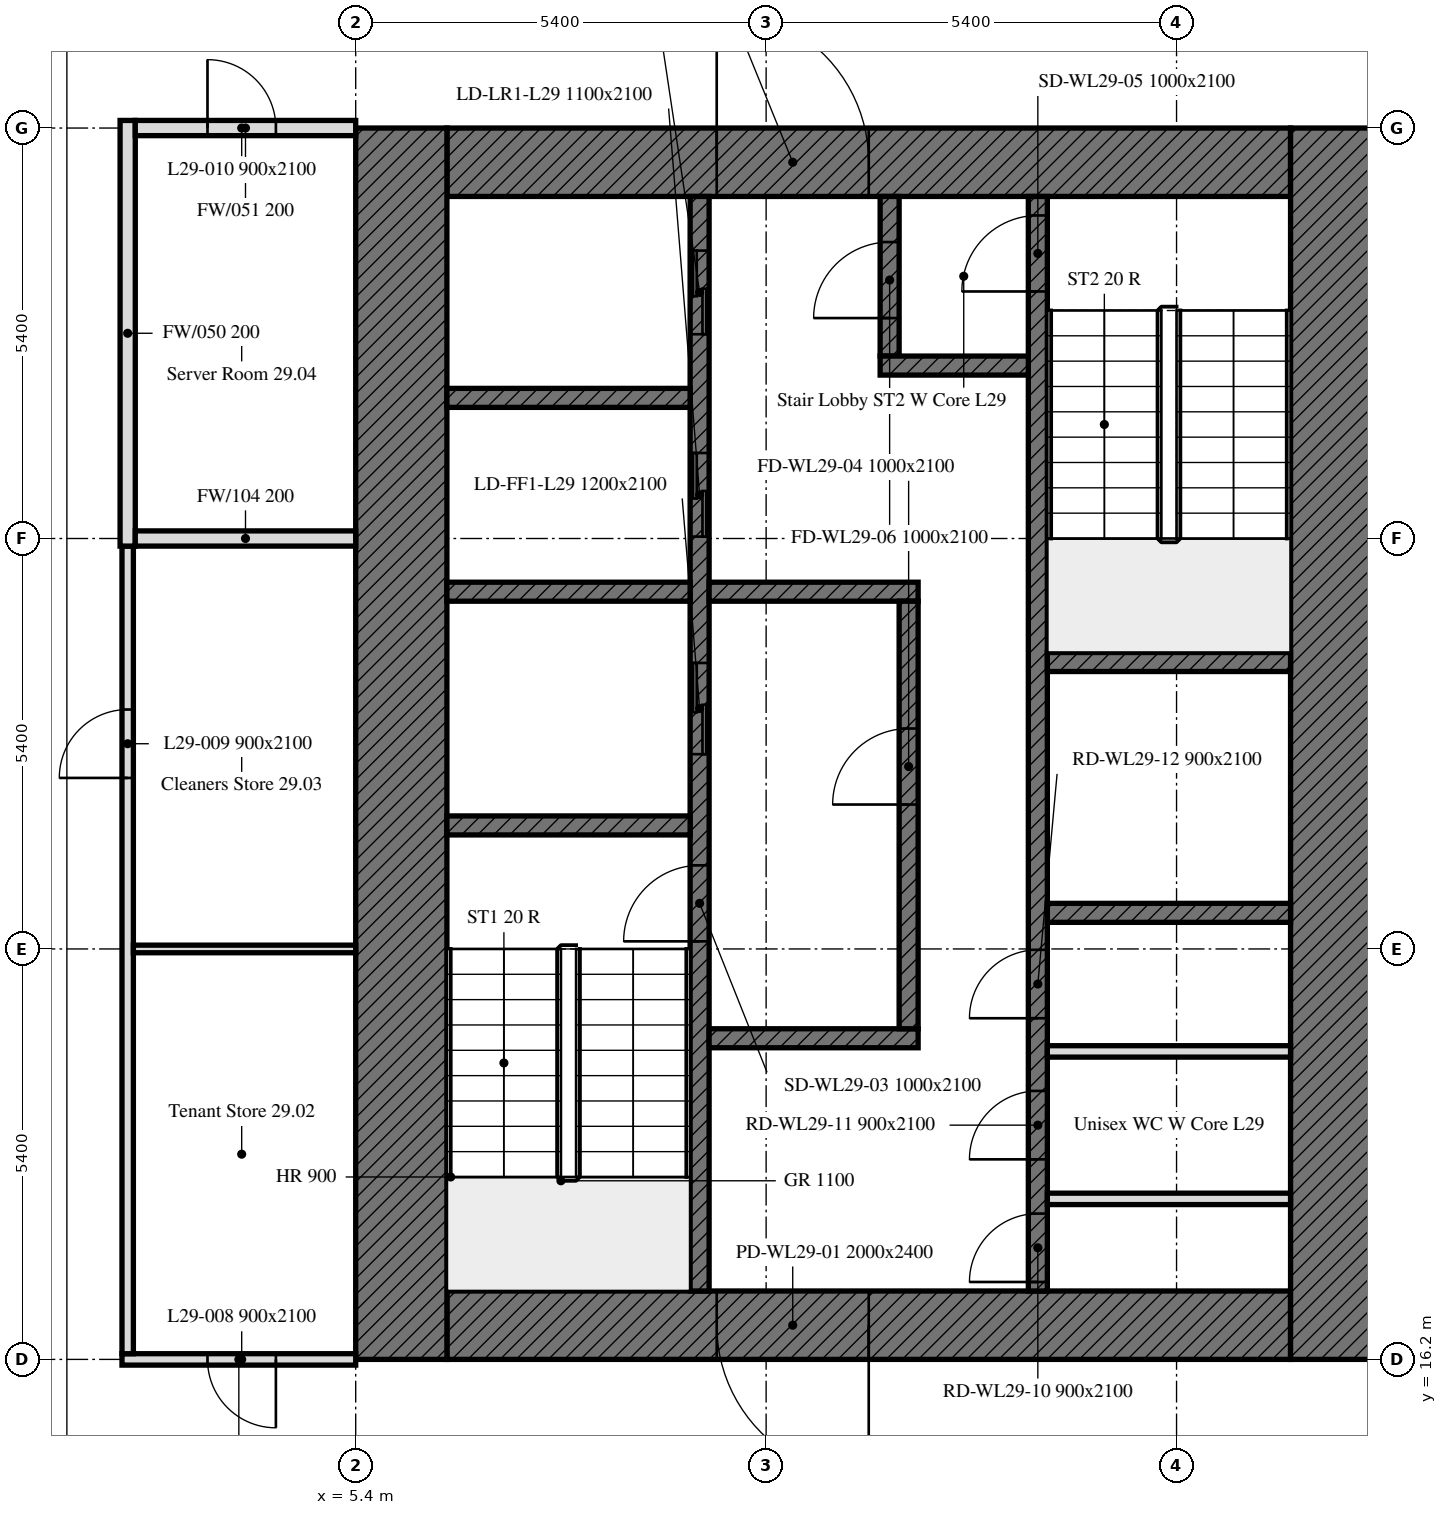
"""IFC4 building model, lengths in metres.
Left out: names, types, materials, properties, quantities, classifications, styles, units other than length and angle.
Written with IfcOpenShell. Run it as: python <this file> out.ifc"""

import sys

from ifc_helpers import new_model, si_unit, direction, frame, frame_2d, origin, place, context, subcontext, project, spatial, rectangle, extrude, element, fill, save


model = new_model("IFC4")
c1 = context("Model", 3, precision=1e-05, world=origin(), true_north=direction((0.0, 1.0)))
c2 = subcontext(c1, "Body", "Model", "MODEL_VIEW")
j1 = project(units=[si_unit("LENGTHUNIT", "METRE"), si_unit("PLANEANGLEUNIT", "RADIAN")], contexts=[c1])
p1 = place(None, origin())
s1 = spatial("IfcSite", under=j1, at=p1, CompositionType="ELEMENT")
p2 = place(p1, origin())
s2 = spatial("IfcBuilding", under=s1, at=p2, CompositionType="ELEMENT")
p3 = place(p2, frame((0.0, 0.0, 122.0)))
s3 = spatial("IfcBuildingStorey", under=s2, at=p3, CompositionType="ELEMENT", Elevation=122.0)
p4 = place(p3, frame((17.7, 16.65, 0.0), z_axis=(0.0, 0.0, 1.0), x_axis=(-1.0, 0.0, 0.0)))
e1 = element("IfcWall", 1, at=p4, inside=s3, PredefinedType="SOLIDWALL", context=c2, shape_type="SweptSolid", body=[
    extrude(rectangle(XDim=11.1, YDim=0.9, at=frame_2d((5.55, 0.0))), origin(), (0.0, 0.0, 1.0), 3.3),
])
p5 = place(p4, frame((5.55, 0.0, 0.0)))
e2 = element("IfcOpeningElement", 2, at=p5, cuts=e1, PredefinedType="OPENING", context=c2, shape_type="SweptSolid", body=[
    extrude(rectangle(XDim=2.0, YDim=2.4, at=frame_2d((1.0, 1.2))), frame((0.0, 0.45, 0.0), z_axis=(0.0, -1.0, 0.0), x_axis=(1.0, 0.0, 0.0)), (0.0, 0.0, 1.0), 0.9),
])
p6 = place(p3, frame((6.6, 31.95, 0.0), z_axis=(0.0, 0.0, 1.0), x_axis=(1.0, 0.0, 0.0)))
e3 = element("IfcWall", 3, at=p6, inside=s3, PredefinedType="SOLIDWALL", context=c2, shape_type="SweptSolid", body=[
    extrude(rectangle(XDim=11.1, YDim=0.9, at=frame_2d((5.55, 0.0))), origin(), (0.0, 0.0, 1.0), 3.3),
])
p7 = place(p6, frame((3.55, 0.0, 0.0)))
e4 = element("IfcOpeningElement", 4, at=p7, cuts=e3, PredefinedType="OPENING", context=c2, shape_type="SweptSolid", body=[
    extrude(rectangle(XDim=2.0, YDim=2.4, at=frame_2d((1.0, 1.2))), frame((0.0, 0.45, 0.0), z_axis=(0.0, -1.0, 0.0), x_axis=(1.0, 0.0, 0.0)), (0.0, 0.0, 1.0), 0.9),
])
for number, where, z_axis, x_axis in (
    (5, (6.0, 16.2, 0.0), (0.0, 0.0, 1.0), (0.0, 1.0, 0.0)),
    (6, (18.3, 32.4, 0.0), (0.0, 0.0, 1.0), (0.0, -1.0, 0.0)),
):
    element("IfcWall", number, at=place(p3, frame(where, z_axis=z_axis, x_axis=x_axis)), inside=s3, PredefinedType="SOLIDWALL", context=c2, shape_type="SweptSolid", body=[
        extrude(rectangle(XDim=16.2, YDim=1.2, at=frame_2d((8.1, 0.0))), origin(), (0.0, 0.0, 1.0), 3.3),
    ])
p8 = place(p3, frame((9.925, 17.1, 0.0), z_axis=(0.0, 0.0, 1.0), x_axis=(0.0, 1.0, 0.0)))
e7 = element("IfcWall", 7, at=p8, inside=s3, PredefinedType="SOLIDWALL", context=c2, shape_type="SweptSolid", body=[
    extrude(rectangle(XDim=14.4, YDim=0.25, at=frame_2d((7.2, 0.0))), origin(), (0.0, 0.0, 1.0), 3.3),
])
p9 = place(p8, frame((4.6, 0.0, 0.0)))
e8 = element("IfcOpeningElement", 8, at=p9, cuts=e7, PredefinedType="OPENING", context=c2, shape_type="SweptSolid", body=[
    extrude(rectangle(XDim=1.0, YDim=2.1, at=frame_2d((0.5, 1.05))), frame((0.0, 0.125, 0.0), z_axis=(0.0, -1.0, 0.0), x_axis=(1.0, 0.0, 0.0)), (0.0, 0.0, 1.0), 0.25),
])
p10 = place(p8, frame((7.062, 0.0, 0.0)))
e9 = element("IfcOpeningElement", 9, at=p10, cuts=e7, PredefinedType="OPENING", context=c2, shape_type="SweptSolid", body=[
    extrude(rectangle(XDim=1.2, YDim=2.1, at=frame_2d((0.6, 1.05))), frame((0.0, 0.125, 0.0), z_axis=(0.0, -1.0, 0.0), x_axis=(1.0, 0.0, 0.0)), (0.0, 0.0, 1.0), 0.25),
])
p11 = place(p8, frame((9.925, 0.0, 0.0)))
e10 = element("IfcOpeningElement", 10, at=p11, cuts=e7, PredefinedType="OPENING", context=c2, shape_type="SweptSolid", body=[
    extrude(rectangle(XDim=1.1, YDim=2.1, at=frame_2d((0.55, 1.05))), frame((0.0, 0.125, 0.0), z_axis=(0.0, -1.0, 0.0), x_axis=(1.0, 0.0, 0.0)), (0.0, 0.0, 1.0), 0.25),
])
p12 = place(p8, frame((12.587, 0.0, 0.0)))
e11 = element("IfcOpeningElement", 11, at=p12, cuts=e7, PredefinedType="OPENING", context=c2, shape_type="SweptSolid", body=[
    extrude(rectangle(XDim=1.1, YDim=2.1, at=frame_2d((0.55, 1.05))), frame((0.0, 0.125, 0.0), z_axis=(0.0, -1.0, 0.0), x_axis=(1.0, 0.0, 0.0)), (0.0, 0.0, 1.0), 0.25),
])
p13 = place(p3, frame((14.375, 17.1, 0.0), z_axis=(0.0, 0.0, 1.0), x_axis=(0.0, 1.0, 0.0)))
e12 = element("IfcWall", 12, at=p13, inside=s3, PredefinedType="SOLIDWALL", context=c2, shape_type="SweptSolid", body=[
    extrude(rectangle(XDim=14.4, YDim=0.25, at=frame_2d((7.2, 0.0))), origin(), (0.0, 0.0, 1.0), 3.3),
])
p14 = place(p13, frame((13.15, 0.0, 0.0)))
e13 = element("IfcOpeningElement", 13, at=p14, cuts=e12, PredefinedType="OPENING", context=c2, shape_type="SweptSolid", body=[
    extrude(rectangle(XDim=1.0, YDim=2.1, at=frame_2d((0.5, 1.05))), frame((0.0, 0.125, 0.0), z_axis=(0.0, -1.0, 0.0), x_axis=(1.0, 0.0, 0.0)), (0.0, 0.0, 1.0), 0.25),
])
p15 = place(p13, frame((0.118, 0.0, 0.0)))
e14 = element("IfcOpeningElement", 14, at=p15, cuts=e12, PredefinedType="OPENING", context=c2, shape_type="SweptSolid", body=[
    extrude(rectangle(XDim=0.9, YDim=2.1, at=frame_2d((0.45, 1.05))), frame((0.0, 0.125, 0.0), z_axis=(0.0, -1.0, 0.0), x_axis=(1.0, 0.0, 0.0)), (0.0, 0.0, 1.0), 0.25),
])
p16 = place(p13, frame((1.732, 0.0, 0.0)))
e15 = element("IfcOpeningElement", 15, at=p16, cuts=e12, PredefinedType="OPENING", context=c2, shape_type="SweptSolid", body=[
    extrude(rectangle(XDim=0.9, YDim=2.1, at=frame_2d((0.45, 1.05))), frame((0.0, 0.125, 0.0), z_axis=(0.0, -1.0, 0.0), x_axis=(1.0, 0.0, 0.0)), (0.0, 0.0, 1.0), 0.25),
])
p17 = place(p13, frame((3.588, 0.0, 0.0)))
e16 = element("IfcOpeningElement", 16, at=p17, cuts=e12, PredefinedType="OPENING", context=c2, shape_type="SweptSolid", body=[
    extrude(rectangle(XDim=0.9, YDim=2.1, at=frame_2d((0.45, 1.05))), frame((0.0, 0.125, 0.0), z_axis=(0.0, -1.0, 0.0), x_axis=(1.0, 0.0, 0.0)), (0.0, 0.0, 1.0), 0.25),
])
for number, where, z_axis, x_axis in (
    (17, (6.6, 23.225, 0.0), (0.0, 0.0, 1.0), (1.0, 0.0, 0.0)),
    (18, (14.5, 25.375, 0.0), (0.0, 0.0, 1.0), (1.0, 0.0, 0.0)),
    (19, (14.5, 22.075, 0.0), (0.0, 0.0, 1.0), (1.0, 0.0, 0.0)),
    (20, (6.6, 26.3, 0.0), (0.0, 0.0, 1.0), (1.0, 0.0, 0.0)),
):
    element("IfcWall", number, at=place(p3, frame(where, z_axis=z_axis, x_axis=x_axis)), inside=s3, PredefinedType="SOLIDWALL", context=c2, shape_type="SweptSolid", body=[
        extrude(rectangle(XDim=3.2, YDim=0.25, at=frame_2d((1.6, 0.0))), origin(), (0.0, 0.0, 1.0), 3.3),
    ])
for number, where, z_axis, x_axis in (
    (21, (10.05, 26.3, 0.0), (0.0, 0.0, 1.0), (1.0, 0.0, 0.0)),
    (22, (10.05, 20.425, 0.0), (0.0, 0.0, 1.0), (1.0, 0.0, 0.0)),
):
    element("IfcWall", number, at=place(p3, frame(where, z_axis=z_axis, x_axis=x_axis)), inside=s3, PredefinedType="SOLIDWALL", context=c2, shape_type="SweptSolid", body=[
        extrude(rectangle(XDim=2.75, YDim=0.25, at=frame_2d((1.375, 0.0))), origin(), (0.0, 0.0, 1.0), 3.3),
    ])
p18 = place(p3, frame((12.425, 29.4, 0.0), z_axis=(0.0, 0.0, 1.0), x_axis=(0.0, 1.0, 0.0)))
e23 = element("IfcWall", 23, at=p18, inside=s3, PredefinedType="SOLIDWALL", context=c2, shape_type="SweptSolid", body=[
    extrude(rectangle(XDim=2.1, YDim=0.25, at=frame_2d((1.05, 0.0))), origin(), (0.0, 0.0, 1.0), 3.3),
])
p19 = place(p18, frame((0.5, 0.0, 0.0)))
e24 = element("IfcOpeningElement", 24, at=p19, cuts=e23, PredefinedType="OPENING", context=c2, shape_type="SweptSolid", body=[
    extrude(rectangle(XDim=1.0, YDim=2.1, at=frame_2d((0.5, 1.05))), frame((0.0, 0.125, 0.0), z_axis=(0.0, -1.0, 0.0), x_axis=(1.0, 0.0, 0.0)), (0.0, 0.0, 1.0), 0.25),
])
p20 = place(p3, frame((12.3, 29.275, 0.0), z_axis=(0.0, 0.0, 1.0), x_axis=(1.0, 0.0, 0.0)))
e25 = element("IfcWall", 25, at=p20, inside=s3, PredefinedType="SOLIDWALL", context=c2, shape_type="SweptSolid", body=[
    extrude(rectangle(XDim=1.95, YDim=0.25, at=frame_2d((0.975, 0.0))), origin(), (0.0, 0.0, 1.0), 3.3),
])
p21 = place(p3, frame((12.675, 20.55, 0.0), z_axis=(0.0, 0.0, 1.0), x_axis=(0.0, 1.0, 0.0)))
e26 = element("IfcWall", 26, at=p21, inside=s3, PredefinedType="SOLIDWALL", context=c2, shape_type="SweptSolid", body=[
    extrude(rectangle(XDim=5.625, YDim=0.25, at=frame_2d((2.812, 0.0))), origin(), (0.0, 0.0, 1.0), 3.3),
])
p22 = place(p21, frame((2.95, 0.0, 0.0)))
e27 = element("IfcOpeningElement", 27, at=p22, cuts=e26, PredefinedType="OPENING", context=c2, shape_type="SweptSolid", body=[
    extrude(rectangle(XDim=1.0, YDim=2.1, at=frame_2d((0.5, 1.05))), frame((0.0, 0.125, 0.0), z_axis=(0.0, -1.0, 0.0), x_axis=(1.0, 0.0, 0.0)), (0.0, 0.0, 1.0), 0.25),
])
p23 = place(p3, frame((6.6, 28.85, 0.0), z_axis=(0.0, 0.0, 1.0), x_axis=(1.0, 0.0, 0.0)))
e28 = element("IfcWall", 28, at=p23, inside=s3, PredefinedType="SOLIDWALL", context=c2, shape_type="SweptSolid", body=[
    extrude(rectangle(XDim=3.2, YDim=0.25, at=frame_2d((1.6, 0.0))), origin(), (0.0, 0.0, 1.0), 3.3),
])
for number, where, z_axis, x_axis in (
    (29, (14.5, 18.312, 0.0), (0.0, 0.0, 1.0), (1.0, 0.0, 0.0)),
    (30, (14.5, 20.252, 0.0), (0.0, 0.0, 1.0), (1.0, 0.0, 0.0)),
):
    element("IfcWall", number, at=place(p3, frame(where, z_axis=z_axis, x_axis=x_axis)), inside=s3, PredefinedType="PARTITIONING", context=c2, shape_type="SweptSolid", body=[
        extrude(rectangle(XDim=3.2, YDim=0.15, at=frame_2d((1.6, 0.0))), origin(), (0.0, 0.0, 1.0), 3.3),
    ])
p24 = place(p3, frame((5.4, 16.2, 0.0), z_axis=(0.0, 0.0, 1.0), x_axis=(-1.0, 0.0, 0.0)))
e31 = element("IfcWall", 31, at=p24, inside=s3, PredefinedType="PARTITIONING", context=c2, shape_type="SweptSolid", body=[
    extrude(rectangle(XDim=3.075, YDim=0.15, at=frame_2d((1.538, 0.0))), origin(), (0.0, 0.0, 1.0), 2.55),
])
p25 = place(p24, frame((1.05, 0.0, 0.0)))
e32 = element("IfcOpeningElement", 32, at=p25, cuts=e31, PredefinedType="OPENING", context=c2, shape_type="SweptSolid", body=[
    extrude(rectangle(XDim=0.9, YDim=2.1, at=frame_2d((0.45, 1.05))), frame((0.0, 0.075, 0.0), z_axis=(0.0, -1.0, 0.0), x_axis=(1.0, 0.0, 0.0)), (0.0, 0.0, 1.0), 0.15),
])
p26 = place(p3, frame((2.4, 16.275, 0.0), z_axis=(0.0, 0.0, 1.0), x_axis=(0.0, 1.0, 0.0)))
e33 = element("IfcWall", 33, at=p26, inside=s3, PredefinedType="PARTITIONING", context=c2, shape_type="SweptSolid", body=[
    extrude(rectangle(XDim=10.625, YDim=0.15, at=frame_2d((5.312, 0.0))), origin(), (0.0, 0.0, 1.0), 3.3),
])
p27 = place(p26, frame((7.575, 0.0, 0.0)))
e34 = element("IfcOpeningElement", 34, at=p27, cuts=e33, PredefinedType="OPENING", context=c2, shape_type="SweptSolid", body=[
    extrude(rectangle(XDim=0.9, YDim=2.1, at=frame_2d((0.45, 1.05))), frame((0.0, 0.075, 0.0), z_axis=(0.0, -1.0, 0.0), x_axis=(1.0, 0.0, 0.0)), (0.0, 0.0, 1.0), 0.15),
])
p28 = place(p3, frame((2.4, 26.9, 0.0), z_axis=(0.0, 0.0, 1.0), x_axis=(0.0, 1.0, 0.0)))
e35 = element("IfcWall", 35, at=p28, inside=s3, PredefinedType="PARTITIONING", context=c2, shape_type="SweptSolid", body=[
    extrude(rectangle(XDim=5.6, YDim=0.2, at=frame_2d((2.8, 0.0))), origin(), (0.0, 0.0, 1.0), 3.3),
])
p29 = place(p3, frame((2.5, 32.4, 0.0), z_axis=(0.0, 0.0, 1.0), x_axis=(1.0, 0.0, 0.0)))
e36 = element("IfcWall", 36, at=p29, inside=s3, PredefinedType="PARTITIONING", context=c2, shape_type="SweptSolid", body=[
    extrude(rectangle(XDim=2.9, YDim=0.2, at=frame_2d((1.45, 0.0))), origin(), (0.0, 0.0, 1.0), 2.55),
])
p30 = place(p29, frame((0.95, 0.0, 0.0)))
e37 = element("IfcOpeningElement", 37, at=p30, cuts=e36, PredefinedType="OPENING", context=c2, shape_type="SweptSolid", body=[
    extrude(rectangle(XDim=0.9, YDim=2.1, at=frame_2d((0.45, 1.05))), frame((0.0, 0.1, 0.0), z_axis=(0.0, -1.0, 0.0), x_axis=(1.0, 0.0, 0.0)), (0.0, 0.0, 1.0), 0.2),
])
p31 = place(p3, frame((5.4, 21.6, 0.0), z_axis=(0.0, 0.0, 1.0), x_axis=(-1.0, 0.0, 0.0)))
e38 = element("IfcWall", 38, at=p31, inside=s3, PredefinedType="PARTITIONING", context=c2, shape_type="SweptSolid", body=[
    extrude(rectangle(XDim=2.925, YDim=0.1, at=frame_2d((1.462, 0.0))), origin(), (0.0, 0.0, 1.0), 2.55),
])
p32 = place(p3, frame((5.4, 27.0, 0.0), z_axis=(0.0, 0.0, 1.0), x_axis=(-1.0, 0.0, 0.0)))
e39 = element("IfcWall", 39, at=p32, inside=s3, PredefinedType="PARTITIONING", context=c2, shape_type="SweptSolid", body=[
    extrude(rectangle(XDim=2.9, YDim=0.2, at=frame_2d((1.45, 0.0))), origin(), (0.0, 0.0, 1.0), 2.55),
])
p33 = place(p5, origin())
e40 = element("IfcDoor", 40, at=p33, inside=s3, OperationType="DOUBLE_DOOR_SINGLE_SWING", PredefinedType="DOOR", context=c2, shape_type="SweptSolid", body=[
    extrude(rectangle(XDim=2.0, YDim=2.4, at=frame_2d((1.0, 1.2))), frame((0.0, 0.025, 0.0), z_axis=(0.0, -1.0, 0.0), x_axis=(1.0, 0.0, 0.0)), (0.0, 0.0, 1.0), 0.05),
])
fill(e2, e40)
p34 = place(p7, origin())
e41 = element("IfcDoor", 41, at=p34, inside=s3, OperationType="DOUBLE_DOOR_SINGLE_SWING", PredefinedType="DOOR", context=c2, shape_type="SweptSolid", body=[
    extrude(rectangle(XDim=2.0, YDim=2.4, at=frame_2d((1.0, 1.2))), frame((0.0, 0.025, 0.0), z_axis=(0.0, -1.0, 0.0), x_axis=(1.0, 0.0, 0.0)), (0.0, 0.0, 1.0), 0.05),
])
fill(e4, e41)
p35 = place(p9, origin())
e42 = element("IfcDoor", 42, at=p35, inside=s3, OperationType="SINGLE_SWING_LEFT", PredefinedType="DOOR", context=c2, shape_type="SweptSolid", body=[
    extrude(rectangle(XDim=1.0, YDim=2.1, at=frame_2d((0.5, 1.05))), frame((0.0, 0.025, 0.0), z_axis=(0.0, -1.0, 0.0), x_axis=(1.0, 0.0, 0.0)), (0.0, 0.0, 1.0), 0.05),
])
fill(e8, e42)
p36 = place(p22, origin())
e43 = element("IfcDoor", 43, at=p36, inside=s3, OperationType="SINGLE_SWING_LEFT", PredefinedType="DOOR", context=c2, shape_type="SweptSolid", body=[
    extrude(rectangle(XDim=1.0, YDim=2.1, at=frame_2d((0.5, 1.05))), frame((0.0, 0.025, 0.0), z_axis=(0.0, -1.0, 0.0), x_axis=(1.0, 0.0, 0.0)), (0.0, 0.0, 1.0), 0.05),
])
fill(e27, e43)
p37 = place(p14, origin())
e44 = element("IfcDoor", 44, at=p37, inside=s3, OperationType="SINGLE_SWING_LEFT", PredefinedType="DOOR", context=c2, shape_type="SweptSolid", body=[
    extrude(rectangle(XDim=1.0, YDim=2.1, at=frame_2d((0.5, 1.05))), frame((0.0, 0.025, 0.0), z_axis=(0.0, -1.0, 0.0), x_axis=(1.0, 0.0, 0.0)), (0.0, 0.0, 1.0), 0.05),
])
fill(e13, e44)
p38 = place(p19, origin())
e45 = element("IfcDoor", 45, at=p38, inside=s3, OperationType="SINGLE_SWING_LEFT", PredefinedType="DOOR", context=c2, shape_type="SweptSolid", body=[
    extrude(rectangle(XDim=1.0, YDim=2.1, at=frame_2d((0.5, 1.05))), frame((0.0, 0.025, 0.0), z_axis=(0.0, -1.0, 0.0), x_axis=(1.0, 0.0, 0.0)), (0.0, 0.0, 1.0), 0.05),
])
fill(e24, e45)
p39 = place(p10, origin())
e46 = element("IfcDoor", 46, at=p39, inside=s3, OperationType="DOUBLE_DOOR_SLIDING", PredefinedType="DOOR", context=c2, shape_type="SweptSolid", body=[
    extrude(rectangle(XDim=1.2, YDim=2.1, at=frame_2d((0.6, 1.05))), frame((0.0, 0.025, 0.0), z_axis=(0.0, -1.0, 0.0), x_axis=(1.0, 0.0, 0.0)), (0.0, 0.0, 1.0), 0.05),
])
fill(e9, e46)
p40 = place(p11, origin())
e47 = element("IfcDoor", 47, at=p40, inside=s3, OperationType="DOUBLE_DOOR_SLIDING", PredefinedType="DOOR", context=c2, shape_type="SweptSolid", body=[
    extrude(rectangle(XDim=1.1, YDim=2.1, at=frame_2d((0.55, 1.05))), frame((0.0, 0.025, 0.0), z_axis=(0.0, -1.0, 0.0), x_axis=(1.0, 0.0, 0.0)), (0.0, 0.0, 1.0), 0.05),
])
fill(e10, e47)
p41 = place(p12, origin())
e48 = element("IfcDoor", 48, at=p41, inside=s3, OperationType="DOUBLE_DOOR_SLIDING", PredefinedType="DOOR", context=c2, shape_type="SweptSolid", body=[
    extrude(rectangle(XDim=1.1, YDim=2.1, at=frame_2d((0.55, 1.05))), frame((0.0, 0.025, 0.0), z_axis=(0.0, -1.0, 0.0), x_axis=(1.0, 0.0, 0.0)), (0.0, 0.0, 1.0), 0.05),
])
fill(e11, e48)
p42 = place(p15, origin())
e49 = element("IfcDoor", 49, at=p42, inside=s3, OperationType="SINGLE_SWING_LEFT", PredefinedType="DOOR", context=c2, shape_type="SweptSolid", body=[
    extrude(rectangle(XDim=0.9, YDim=2.1, at=frame_2d((0.45, 1.05))), frame((0.0, 0.025, 0.0), z_axis=(0.0, -1.0, 0.0), x_axis=(1.0, 0.0, 0.0)), (0.0, 0.0, 1.0), 0.05),
])
fill(e14, e49)
p43 = place(p16, origin())
e50 = element("IfcDoor", 50, at=p43, inside=s3, OperationType="SINGLE_SWING_LEFT", PredefinedType="DOOR", context=c2, shape_type="SweptSolid", body=[
    extrude(rectangle(XDim=0.9, YDim=2.1, at=frame_2d((0.45, 1.05))), frame((0.0, 0.025, 0.0), z_axis=(0.0, -1.0, 0.0), x_axis=(1.0, 0.0, 0.0)), (0.0, 0.0, 1.0), 0.05),
])
fill(e15, e50)
p44 = place(p17, origin())
e51 = element("IfcDoor", 51, at=p44, inside=s3, OperationType="SINGLE_SWING_LEFT", PredefinedType="DOOR", context=c2, shape_type="SweptSolid", body=[
    extrude(rectangle(XDim=0.9, YDim=2.1, at=frame_2d((0.45, 1.05))), frame((0.0, 0.025, 0.0), z_axis=(0.0, -1.0, 0.0), x_axis=(1.0, 0.0, 0.0)), (0.0, 0.0, 1.0), 0.05),
])
fill(e16, e51)
p45 = place(p25, origin())
e52 = element("IfcDoor", 52, at=p45, inside=s3, OperationType="SINGLE_SWING_LEFT", PredefinedType="DOOR", context=c2, shape_type="SweptSolid", body=[
    extrude(rectangle(XDim=0.9, YDim=2.1, at=frame_2d((0.45, 1.05))), frame((0.0, 0.025, 0.0), z_axis=(0.0, -1.0, 0.0), x_axis=(1.0, 0.0, 0.0)), (0.0, 0.0, 1.0), 0.05),
])
fill(e32, e52)
p46 = place(p27, origin())
e53 = element("IfcDoor", 53, at=p46, inside=s3, OperationType="SINGLE_SWING_LEFT", PredefinedType="DOOR", context=c2, shape_type="SweptSolid", body=[
    extrude(rectangle(XDim=0.9, YDim=2.1, at=frame_2d((0.45, 1.05))), frame((0.0, 0.025, 0.0), z_axis=(0.0, -1.0, 0.0), x_axis=(1.0, 0.0, 0.0)), (0.0, 0.0, 1.0), 0.05),
])
fill(e34, e53)
p47 = place(p30, origin())
e54 = element("IfcDoor", 54, at=p47, inside=s3, OperationType="SINGLE_SWING_LEFT", PredefinedType="DOOR", context=c2, shape_type="SweptSolid", body=[
    extrude(rectangle(XDim=0.9, YDim=2.1, at=frame_2d((0.45, 1.05))), frame((0.0, 0.025, 0.0), z_axis=(0.0, -1.0, 0.0), x_axis=(1.0, 0.0, 0.0)), (0.0, 0.0, 1.0), 0.05),
])
fill(e37, e54)
save(model, sys.argv[1])
